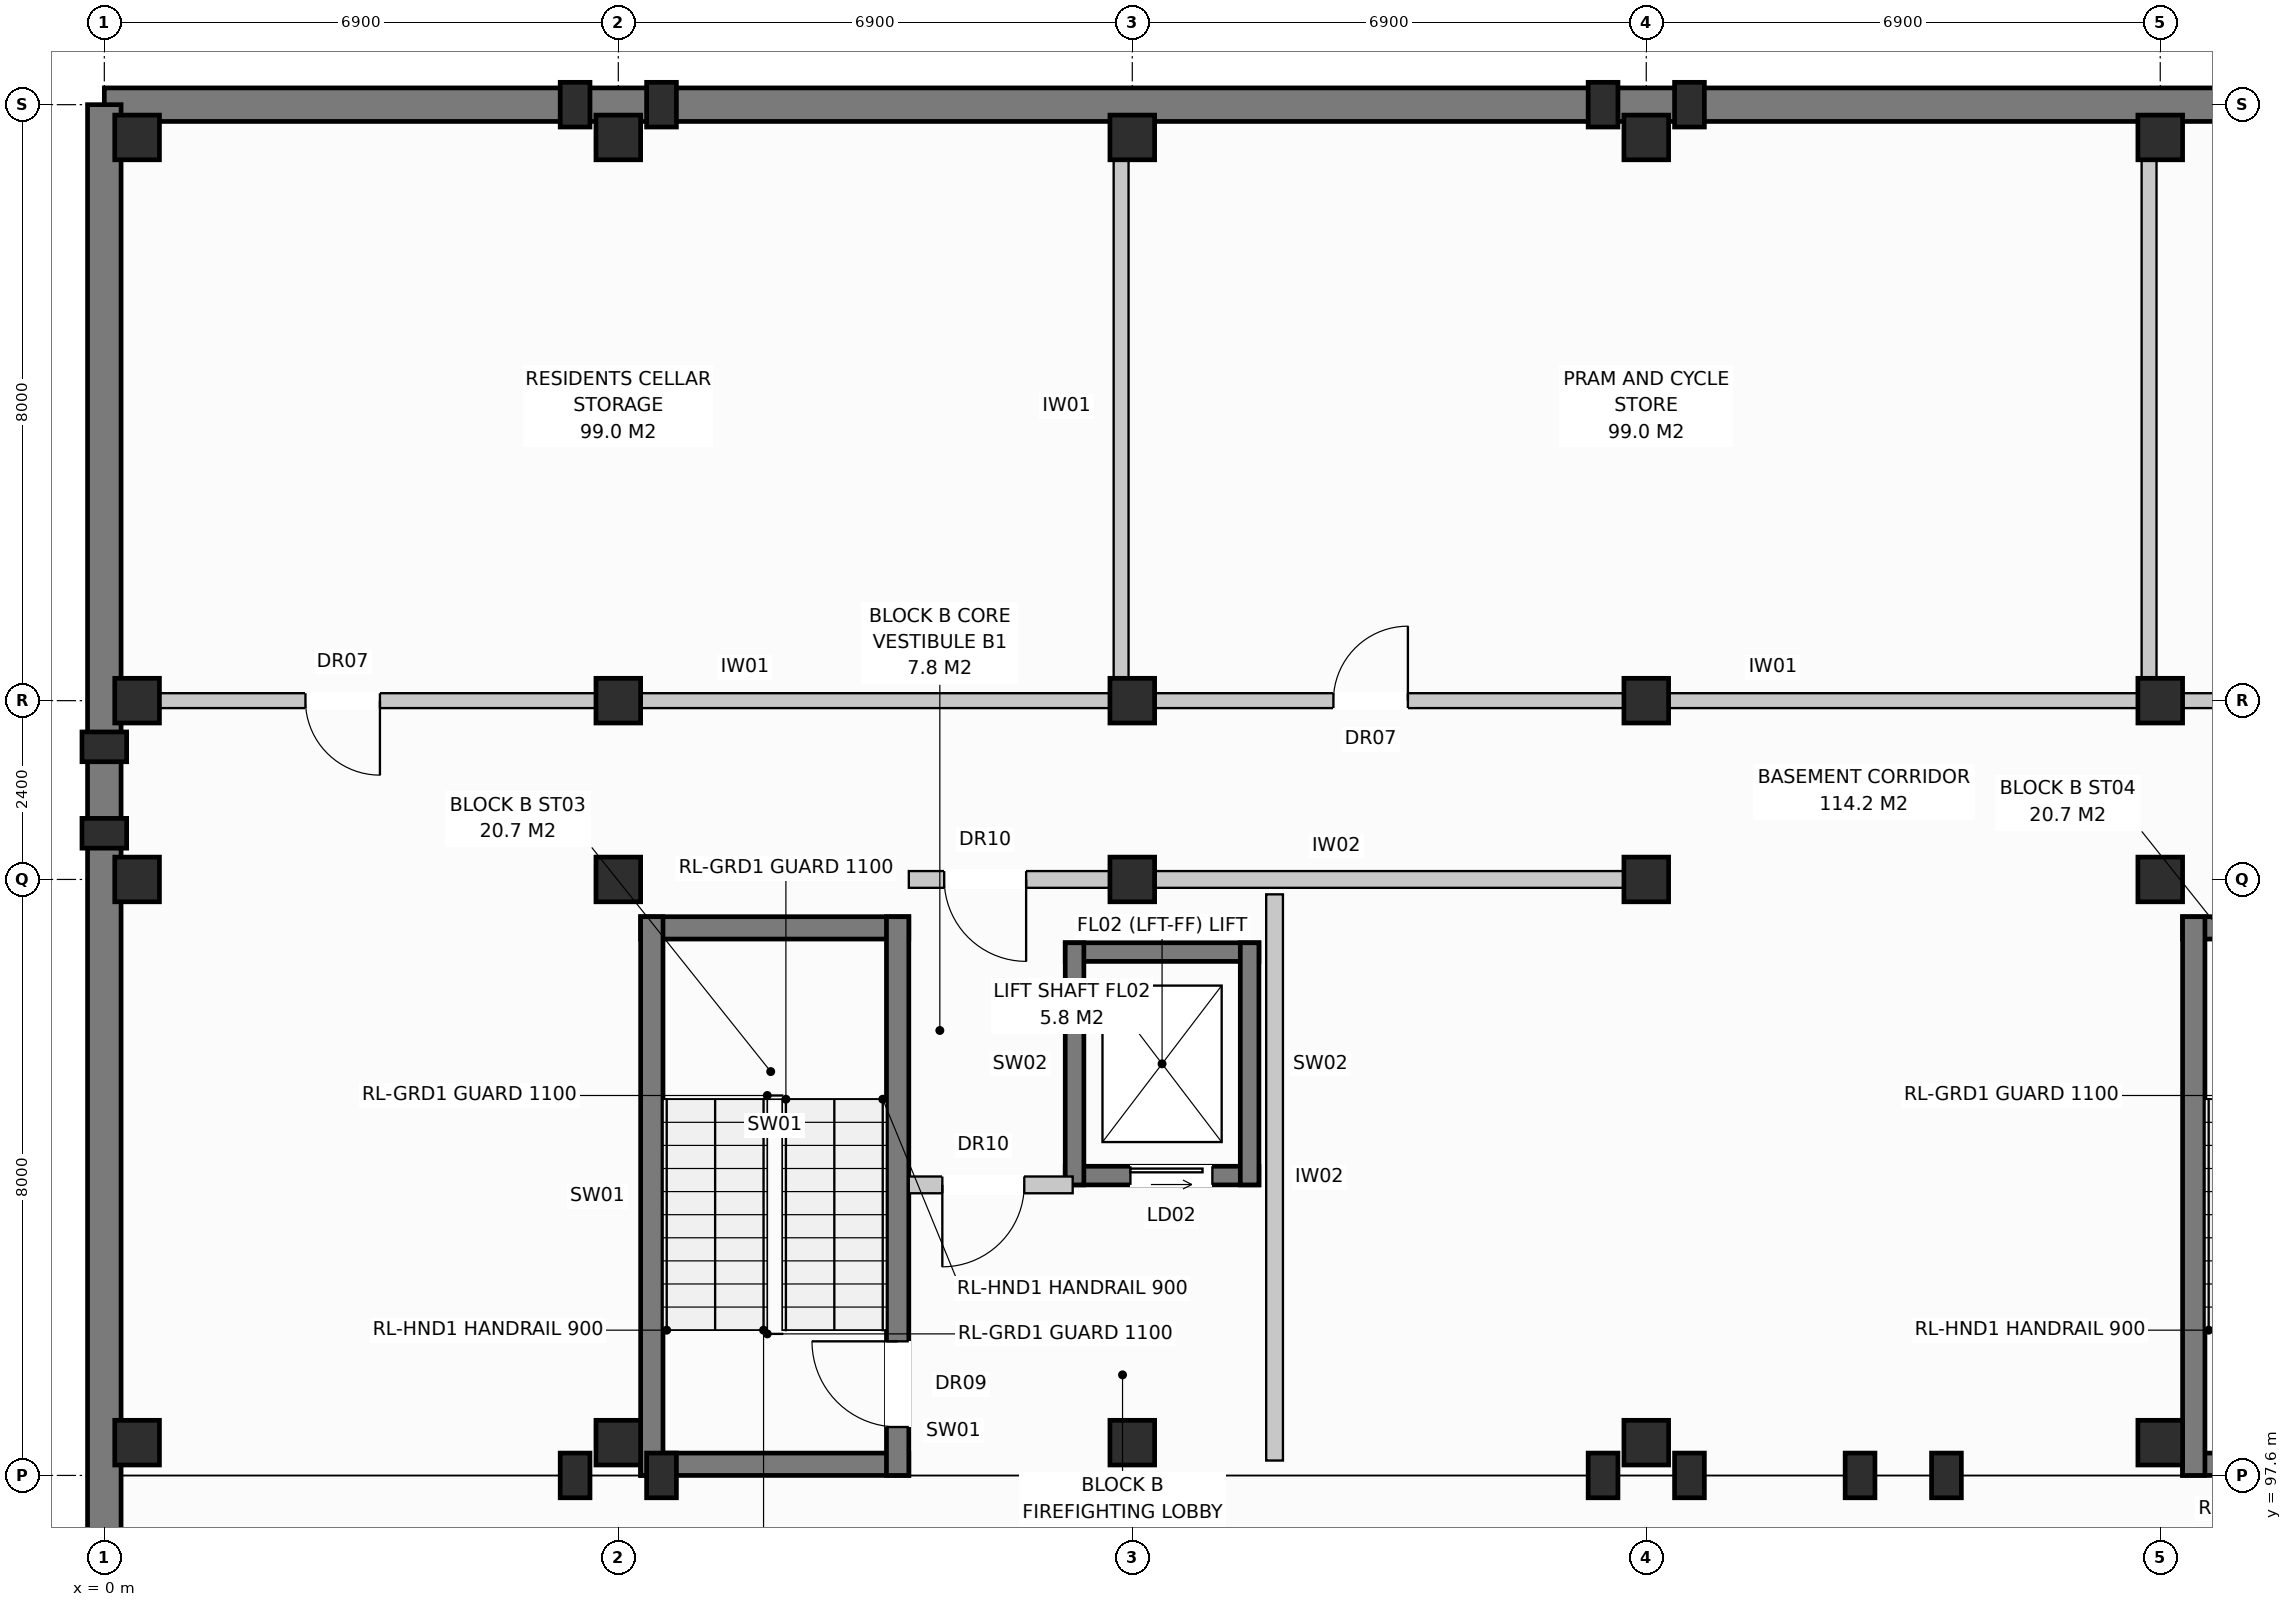
"""IFC4 building model, lengths in metres.
Left out: names, types, materials, properties, quantities, classifications, styles, units other than length and angle.
Written with IfcOpenShell. Run it as: python <this file> out.ifc"""

import sys

from ifc_helpers import new_model, si_unit, direction, frame, frame_2d, origin, origin_with_axes, origin_2d, place, context, subcontext, project, spatial, rectangle, extrude, element, fill, save


model = new_model("IFC4")
c1 = context("Model", 3, precision=1e-05, world=origin(), true_north=direction((0.0, 1.0)))
c2 = subcontext(c1, "Body", "Model", "MODEL_VIEW")
j1 = project(units=[si_unit("LENGTHUNIT", "METRE"), si_unit("PLANEANGLEUNIT", "RADIAN")], contexts=[c1])
p1 = place(None, origin())
s1 = spatial("IfcSite", under=j1, at=p1, CompositionType="ELEMENT")
p2 = place(p1, origin())
s2 = spatial("IfcBuilding", under=s1, at=p2, CompositionType="ELEMENT")
p3 = place(p2, frame((0.0, 0.0, -3.8)))
s3 = spatial("IfcBuildingStorey", under=s2, at=p3, CompositionType="ELEMENT", Elevation=-3.8)
for number, where, z_axis, x_axis in (
    (1, (0.44, 98.04, 0.0), (0.0, 0.0, 1.0), (1.0, 0.0, 0.0)),
    (2, (0.44, 105.6, 0.0), (0.0, 0.0, 1.0), (1.0, 0.0, 0.0)),
    (3, (0.44, 108.0, 0.0), (0.0, 0.0, 1.0), (1.0, 0.0, 0.0)),
    (4, (0.44, 115.56, 0.0), (0.0, 0.0, 1.0), (1.0, 0.0, 0.0)),
    (5, (6.9, 98.04, 0.0), (0.0, 0.0, 1.0), (1.0, 0.0, 0.0)),
    (6, (6.9, 105.6, 0.0), (0.0, 0.0, 1.0), (1.0, 0.0, 0.0)),
    (7, (6.9, 108.0, 0.0), (0.0, 0.0, 1.0), (1.0, 0.0, 0.0)),
    (8, (6.9, 115.56, 0.0), (0.0, 0.0, 1.0), (1.0, 0.0, 0.0)),
    (9, (13.8, 98.04, 0.0), (0.0, 0.0, 1.0), (1.0, 0.0, 0.0)),
    (10, (13.8, 105.6, 0.0), (0.0, 0.0, 1.0), (1.0, 0.0, 0.0)),
    (11, (13.8, 108.0, 0.0), (0.0, 0.0, 1.0), (1.0, 0.0, 0.0)),
    (12, (13.8, 115.56, 0.0), (0.0, 0.0, 1.0), (1.0, 0.0, 0.0)),
    (13, (20.7, 98.04, 0.0), (0.0, 0.0, 1.0), (1.0, 0.0, 0.0)),
    (14, (20.7, 105.6, 0.0), (0.0, 0.0, 1.0), (1.0, 0.0, 0.0)),
    (15, (20.7, 108.0, 0.0), (0.0, 0.0, 1.0), (1.0, 0.0, 0.0)),
    (16, (20.7, 115.56, 0.0), (0.0, 0.0, 1.0), (1.0, 0.0, 0.0)),
    (17, (27.6, 98.04, 0.0), (0.0, 0.0, 1.0), (1.0, 0.0, 0.0)),
    (18, (27.6, 105.6, 0.0), (0.0, 0.0, 1.0), (1.0, 0.0, 0.0)),
    (19, (27.6, 108.0, 0.0), (0.0, 0.0, 1.0), (1.0, 0.0, 0.0)),
    (20, (27.6, 115.56, 0.0), (0.0, 0.0, 1.0), (1.0, 0.0, 0.0)),
):
    element("IfcColumn", number, at=place(p3, frame(where, z_axis=z_axis, x_axis=x_axis)), inside=s3, PredefinedType="COLUMN", context=c2, shape_type="SweptSolid", body=[
        extrude(rectangle(XDim=0.6, YDim=0.6, at=origin_2d()), origin(), (0.0, 0.0, 1.0), 3.8),
    ])
for number, where, z_axis, x_axis in (
    (21, (6.32, 116.0, 0.0), (0.0, 0.0, 1.0), (1.0, 0.0, 0.0)),
    (22, (6.32, 97.6, 0.0), (0.0, 0.0, 1.0), (1.0, 0.0, 0.0)),
    (23, (7.48, 116.0, 0.0), (0.0, 0.0, 1.0), (1.0, 0.0, 0.0)),
    (24, (7.48, 97.6, 0.0), (0.0, 0.0, 1.0), (1.0, 0.0, 0.0)),
    (25, (20.12, 116.0, 0.0), (0.0, 0.0, 1.0), (1.0, 0.0, 0.0)),
    (26, (20.12, 97.6, 0.0), (0.0, 0.0, 1.0), (1.0, 0.0, 0.0)),
    (27, (21.28, 116.0, 0.0), (0.0, 0.0, 1.0), (1.0, 0.0, 0.0)),
    (28, (21.28, 97.6, 0.0), (0.0, 0.0, 1.0), (1.0, 0.0, 0.0)),
    (29, (23.57, 97.6, 0.0), (0.0, 0.0, 1.0), (1.0, 0.0, 0.0)),
    (30, (24.73, 97.6, 0.0), (0.0, 0.0, 1.0), (1.0, 0.0, 0.0)),
    (31, (0.0, 106.22, 0.0), (0.0, 0.0, 1.0), (0.0, 1.0, 0.0)),
    (32, (0.0, 107.38, 0.0), (0.0, 0.0, 1.0), (0.0, 1.0, 0.0)),
):
    element("IfcColumn", number, at=place(p3, frame(where, z_axis=z_axis, x_axis=x_axis)), inside=s3, PredefinedType="PILASTER", context=c2, shape_type="SweptSolid", body=[
        extrude(rectangle(XDim=0.4, YDim=0.6, at=origin_2d()), origin(), (0.0, 0.0, 1.0), 3.8),
    ])
p4 = place(p3, frame((168.0, 116.0, 0.0), z_axis=(0.0, 0.0, 1.0), x_axis=(-1.0, 0.0, 0.0)))
e33 = element("IfcWall", 33, at=p4, inside=s3, PredefinedType="STANDARD", context=c2, shape_type="SweptSolid", body=[
    extrude(rectangle(XDim=168.0, YDim=0.45, at=frame_2d((84.0, 0.0))), origin(), (0.0, 0.0, 1.0), 3.48),
])
p5 = place(p3, frame((0.0, 116.0, 0.0), z_axis=(0.0, 0.0, 1.0), x_axis=(0.0, -1.0, 0.0)))
e34 = element("IfcWall", 34, at=p5, inside=s3, PredefinedType="STANDARD", context=c2, shape_type="SweptSolid", body=[
    extrude(rectangle(XDim=116.0, YDim=0.45, at=frame_2d((58.0, 0.0))), origin(), (0.0, 0.0, 1.0), 3.48),
])
for number, where, z_axis, x_axis in (
    (35, (7.2, 97.75, 0.0), (0.0, 0.0, 1.0), (1.0, 0.0, 0.0)),
    (36, (7.2, 104.95, 0.0), (0.0, 0.0, 1.0), (1.0, 0.0, 0.0)),
):
    element("IfcWall", number, at=place(p3, frame(where, z_axis=z_axis, x_axis=x_axis)), inside=s3, PredefinedType="SHEAR", context=c2, shape_type="SweptSolid", body=[
        extrude(rectangle(XDim=3.6, YDim=0.3, at=frame_2d((1.8, 0.0))), origin(), (0.0, 0.0, 1.0), 3.48),
    ])
p6 = place(p3, frame((7.35, 97.6, 0.0), z_axis=(0.0, 0.0, 1.0), x_axis=(0.0, 1.0, 0.0)))
e37 = element("IfcWall", 37, at=p6, inside=s3, PredefinedType="SHEAR", context=c2, shape_type="SweptSolid", body=[
    extrude(rectangle(XDim=7.5, YDim=0.3, at=frame_2d((3.75, 0.0))), origin(), (0.0, 0.0, 1.0), 3.48),
])
p7 = place(p3, frame((10.65, 97.6, 0.0), z_axis=(0.0, 0.0, 1.0), x_axis=(0.0, 1.0, 0.0)))
e38 = element("IfcWall", 38, at=p7, inside=s3, PredefinedType="SHEAR", context=c2, shape_type="SweptSolid", body=[
    extrude(rectangle(XDim=7.5, YDim=0.3, at=frame_2d((3.75, 0.0))), origin(), (0.0, 0.0, 1.0), 3.48),
])
p8 = place(p7, frame((0.65, 0.0, 0.0)))
e39 = element("IfcOpeningElement", 39, at=p8, cuts=e38, PredefinedType="OPENING", context=c2, shape_type="SweptSolid", body=[
    extrude(rectangle(XDim=1.15, YDim=2.15, at=frame_2d((0.575, 1.075))), frame((0.0, 0.162, 0.0), z_axis=(0.0, -1.0, 0.0), x_axis=(1.0, 0.0, 0.0)), (0.0, 0.0, 1.0), 0.324),
])
p9 = place(p3, frame((12.9, 101.625, 0.0), z_axis=(0.0, 0.0, 1.0), x_axis=(1.0, 0.0, 0.0)))
e40 = element("IfcWall", 40, at=p9, inside=s3, PredefinedType="SHEAR", context=c2, shape_type="SweptSolid", body=[
    extrude(rectangle(XDim=2.6, YDim=0.25, at=frame_2d((1.3, 0.0))), origin(), (0.0, 0.0, 1.0), 3.48),
])
p10 = place(p9, frame((0.875, 0.0, 0.0)))
e41 = element("IfcOpeningElement", 41, at=p10, cuts=e40, PredefinedType="OPENING", context=c2, shape_type="SweptSolid", body=[
    extrude(rectangle(XDim=1.1, YDim=2.1, at=frame_2d((0.55, 1.05))), frame((0.0, 0.137, 0.0), z_axis=(0.0, -1.0, 0.0), x_axis=(1.0, 0.0, 0.0)), (0.0, 0.0, 1.0), 0.274),
])
p11 = place(p3, frame((12.9, 104.625, 0.0), z_axis=(0.0, 0.0, 1.0), x_axis=(1.0, 0.0, 0.0)))
e42 = element("IfcWall", 42, at=p11, inside=s3, PredefinedType="SHEAR", context=c2, shape_type="SweptSolid", body=[
    extrude(rectangle(XDim=2.6, YDim=0.25, at=frame_2d((1.3, 0.0))), origin(), (0.0, 0.0, 1.0), 3.48),
])
for number, where, z_axis, x_axis in (
    (43, (13.025, 101.5, 0.0), (0.0, 0.0, 1.0), (0.0, 1.0, 0.0)),
    (44, (15.375, 101.5, 0.0), (0.0, 0.0, 1.0), (0.0, 1.0, 0.0)),
):
    element("IfcWall", number, at=place(p3, frame(where, z_axis=z_axis, x_axis=x_axis)), inside=s3, PredefinedType="SHEAR", context=c2, shape_type="SweptSolid", body=[
        extrude(rectangle(XDim=3.25, YDim=0.25, at=frame_2d((1.625, 0.0))), origin(), (0.0, 0.0, 1.0), 3.48),
    ])
p12 = place(p3, frame((15.71, 97.8, 0.0), z_axis=(0.0, 0.0, 1.0), x_axis=(0.0, 1.0, 0.0)))
e45 = element("IfcWall", 45, at=p12, inside=s3, PredefinedType="PARTITIONING", context=c2, shape_type="SweptSolid", body=[
    extrude(rectangle(XDim=7.6, YDim=0.225, at=frame_2d((3.8, 0.0))), origin(), (0.0, 0.0, 1.0), 3.19),
])
p13 = place(p3, frame((10.8, 101.5, 0.0), z_axis=(0.0, 0.0, 1.0), x_axis=(1.0, 0.0, 0.0)))
e46 = element("IfcWall", 46, at=p13, inside=s3, PredefinedType="PARTITIONING", context=c2, shape_type="SweptSolid", body=[
    extrude(rectangle(XDim=2.2, YDim=0.225, at=frame_2d((1.1, 0.0))), origin(), (0.0, 0.0, 1.0), 3.48),
])
p14 = place(p13, frame((0.45, 0.0, 0.0)))
e47 = element("IfcOpeningElement", 47, at=p14, cuts=e46, PredefinedType="OPENING", context=c2, shape_type="SweptSolid", body=[
    extrude(rectangle(XDim=1.1, YDim=2.15, at=frame_2d((0.55, 1.075))), frame((0.0, 0.125, 0.0), z_axis=(0.0, -1.0, 0.0), x_axis=(1.0, 0.0, 0.0)), (0.0, 0.0, 1.0), 0.249),
])
p15 = place(p3, frame((6.9, 105.6, 0.0), z_axis=(0.0, 0.0, 1.0), x_axis=(1.0, 0.0, 0.0)))
e48 = element("IfcWall", 48, at=p15, inside=s3, PredefinedType="PARTITIONING", context=c2, shape_type="SweptSolid", body=[
    extrude(rectangle(XDim=0.3, YDim=0.225, at=frame_2d((0.15, 0.0))), origin(), (0.0, 0.0, 1.0), 3.48),
])
p16 = place(p3, frame((10.8, 105.6, 0.0), z_axis=(0.0, 0.0, 1.0), x_axis=(1.0, 0.0, 0.0)))
e49 = element("IfcWall", 49, at=p16, inside=s3, PredefinedType="PARTITIONING", context=c2, shape_type="SweptSolid", body=[
    extrude(rectangle(XDim=9.9, YDim=0.225, at=frame_2d((4.95, 0.0))), origin(), (0.0, 0.0, 1.0), 2.92),
])
p17 = place(p16, frame((0.475, 0.0, 0.0)))
e50 = element("IfcOpeningElement", 50, at=p17, cuts=e49, PredefinedType="OPENING", context=c2, shape_type="SweptSolid", body=[
    extrude(rectangle(XDim=1.1, YDim=2.15, at=frame_2d((0.55, 1.075))), frame((0.0, 0.125, 0.0), z_axis=(0.0, -1.0, 0.0), x_axis=(1.0, 0.0, 0.0)), (0.0, 0.0, 1.0), 0.249),
])
for number, where, z_axis, x_axis in (
    (51, (27.9, 97.75, 0.0), (0.0, 0.0, 1.0), (1.0, 0.0, 0.0)),
    (52, (27.9, 104.95, 0.0), (0.0, 0.0, 1.0), (1.0, 0.0, 0.0)),
):
    element("IfcWall", number, at=place(p3, frame(where, z_axis=z_axis, x_axis=x_axis)), inside=s3, PredefinedType="SHEAR", context=c2, shape_type="SweptSolid", body=[
        extrude(rectangle(XDim=3.6, YDim=0.3, at=frame_2d((1.8, 0.0))), origin(), (0.0, 0.0, 1.0), 3.48),
    ])
p18 = place(p3, frame((28.05, 97.6, 0.0), z_axis=(0.0, 0.0, 1.0), x_axis=(0.0, 1.0, 0.0)))
e53 = element("IfcWall", 53, at=p18, inside=s3, PredefinedType="SHEAR", context=c2, shape_type="SweptSolid", body=[
    extrude(rectangle(XDim=7.5, YDim=0.3, at=frame_2d((3.75, 0.0))), origin(), (0.0, 0.0, 1.0), 3.48),
])
p19 = place(p3, frame((27.6, 105.6, 0.0), z_axis=(0.0, 0.0, 1.0), x_axis=(1.0, 0.0, 0.0)))
e54 = element("IfcWall", 54, at=p19, inside=s3, PredefinedType="PARTITIONING", context=c2, shape_type="SweptSolid", body=[
    extrude(rectangle(XDim=0.3, YDim=0.225, at=frame_2d((0.15, 0.0))), origin(), (0.0, 0.0, 1.0), 3.48),
])
p20 = place(p3, frame((0.3, 108.0, 0.0), z_axis=(0.0, 0.0, 1.0), x_axis=(1.0, 0.0, 0.0)))
e55 = element("IfcWall", 55, at=p20, inside=s3, PredefinedType="PARTITIONING", context=c2, shape_type="SweptSolid", body=[
    extrude(rectangle(XDim=13.2, YDim=0.2, at=frame_2d((6.6, 0.0))), origin(), (0.0, 0.0, 1.0), 2.92),
])
p21 = place(p20, frame((2.4, 0.0, 0.0)))
e56 = element("IfcOpeningElement", 56, at=p21, cuts=e55, PredefinedType="OPENING", context=c2, shape_type="SweptSolid", body=[
    extrude(rectangle(XDim=1.0, YDim=2.15, at=frame_2d((0.5, 1.075))), frame((0.0, 0.112, 0.0), z_axis=(0.0, -1.0, 0.0), x_axis=(1.0, 0.0, 0.0)), (0.0, 0.0, 1.0), 0.224),
])
p22 = place(p3, frame((13.65, 108.2, 0.0), z_axis=(0.0, 0.0, 1.0), x_axis=(0.0, 1.0, 0.0)))
e57 = element("IfcWall", 57, at=p22, inside=s3, PredefinedType="PARTITIONING", context=c2, shape_type="SweptSolid", body=[
    extrude(rectangle(XDim=7.5, YDim=0.2, at=frame_2d((3.75, 0.0))), origin(), (0.0, 0.0, 1.0), 3.48),
])
p23 = place(p3, frame((14.1, 108.0, 0.0), z_axis=(0.0, 0.0, 1.0), x_axis=(1.0, 0.0, 0.0)))
e58 = element("IfcWall", 58, at=p23, inside=s3, PredefinedType="PARTITIONING", context=c2, shape_type="SweptSolid", body=[
    extrude(rectangle(XDim=13.2, YDim=0.2, at=frame_2d((6.6, 0.0))), origin(), (0.0, 0.0, 1.0), 2.92),
])
p24 = place(p23, frame((2.4, 0.0, 0.0)))
e59 = element("IfcOpeningElement", 59, at=p24, cuts=e58, PredefinedType="OPENING", context=c2, shape_type="SweptSolid", body=[
    extrude(rectangle(XDim=1.0, YDim=2.15, at=frame_2d((0.5, 1.075))), frame((0.0, 0.112, 0.0), z_axis=(0.0, -1.0, 0.0), x_axis=(1.0, 0.0, 0.0)), (0.0, 0.0, 1.0), 0.224),
])
p25 = place(p3, frame((27.45, 108.2, 0.0), z_axis=(0.0, 0.0, 1.0), x_axis=(0.0, 1.0, 0.0)))
e60 = element("IfcWall", 60, at=p25, inside=s3, PredefinedType="PARTITIONING", context=c2, shape_type="SweptSolid", body=[
    extrude(rectangle(XDim=7.5, YDim=0.2, at=frame_2d((3.75, 0.0))), origin(), (0.0, 0.0, 1.0), 3.48),
])
p26 = place(p3, frame((27.9, 108.0, 0.0), z_axis=(0.0, 0.0, 1.0), x_axis=(1.0, 0.0, 0.0)))
e61 = element("IfcWall", 61, at=p26, inside=s3, PredefinedType="PARTITIONING", context=c2, shape_type="SweptSolid", body=[
    extrude(rectangle(XDim=13.2, YDim=0.2, at=frame_2d((6.6, 0.0))), origin(), (0.0, 0.0, 1.0), 2.92),
])
p27 = place(p26, frame((2.4, 0.0, 0.0)))
e62 = element("IfcOpeningElement", 62, at=p27, cuts=e61, PredefinedType="OPENING", context=c2, shape_type="SweptSolid", body=[
    extrude(rectangle(XDim=1.0, YDim=2.15, at=frame_2d((0.5, 1.075))), frame((0.0, 0.112, 0.0), z_axis=(0.0, -1.0, 0.0), x_axis=(1.0, 0.0, 0.0)), (0.0, 0.0, 1.0), 0.224),
])
p28 = place(p8, origin_with_axes())
e63 = element("IfcDoor", 63, at=p28, inside=s3, OperationType="SINGLE_SWING_RIGHT", PredefinedType="DOOR", context=c2, shape_type="SweptSolid", body=[
    extrude(rectangle(XDim=1.15, YDim=2.15, at=frame_2d((0.575, 1.075))), frame((0.0, 0.025, 0.0), z_axis=(0.0, -1.0, 0.0), x_axis=(1.0, 0.0, 0.0)), (0.0, 0.0, 1.0), 0.05),
])
fill(e39, e63)
p29 = place(p10, origin_with_axes())
e64 = element("IfcDoor", 64, at=p29, inside=s3, OperationType="SLIDING_TO_LEFT", PredefinedType="DOOR", context=c2, shape_type="SweptSolid", body=[
    extrude(rectangle(XDim=1.1, YDim=2.1, at=frame_2d((0.55, 1.05))), frame((0.0, 0.025, 0.0), z_axis=(0.0, -1.0, 0.0), x_axis=(1.0, 0.0, 0.0)), (0.0, 0.0, 1.0), 0.05),
])
fill(e41, e64)
p30 = place(p14, frame((1.1, 0.0, 0.0), z_axis=(0.0, 0.0, 1.0), x_axis=(-1.0, 0.0, 0.0)))
e65 = element("IfcDoor", 65, at=p30, inside=s3, OperationType="SINGLE_SWING_LEFT", PredefinedType="DOOR", context=c2, shape_type="SweptSolid", body=[
    extrude(rectangle(XDim=1.1, YDim=2.15, at=frame_2d((0.55, 1.075))), frame((0.0, 0.025, 0.0), z_axis=(0.0, -1.0, 0.0), x_axis=(1.0, 0.0, 0.0)), (0.0, 0.0, 1.0), 0.05),
])
fill(e47, e65)
p31 = place(p17, frame((1.1, 0.0, 0.0), z_axis=(0.0, 0.0, 1.0), x_axis=(-1.0, 0.0, 0.0)))
e66 = element("IfcDoor", 66, at=p31, inside=s3, OperationType="SINGLE_SWING_RIGHT", PredefinedType="DOOR", context=c2, shape_type="SweptSolid", body=[
    extrude(rectangle(XDim=1.1, YDim=2.15, at=frame_2d((0.55, 1.075))), frame((0.0, 0.025, 0.0), z_axis=(0.0, -1.0, 0.0), x_axis=(1.0, 0.0, 0.0)), (0.0, 0.0, 1.0), 0.05),
])
fill(e50, e66)
p32 = place(p21, frame((1.0, 0.0, 0.0), z_axis=(0.0, 0.0, 1.0), x_axis=(-1.0, 0.0, 0.0)))
e67 = element("IfcDoor", 67, at=p32, inside=s3, OperationType="SINGLE_SWING_RIGHT", PredefinedType="DOOR", context=c2, shape_type="SweptSolid", body=[
    extrude(rectangle(XDim=1.0, YDim=2.15, at=frame_2d((0.5, 1.075))), frame((0.0, 0.025, 0.0), z_axis=(0.0, -1.0, 0.0), x_axis=(1.0, 0.0, 0.0)), (0.0, 0.0, 1.0), 0.05),
])
fill(e56, e67)
p33 = place(p24, origin_with_axes())
e68 = element("IfcDoor", 68, at=p33, inside=s3, OperationType="SINGLE_SWING_RIGHT", PredefinedType="DOOR", context=c2, shape_type="SweptSolid", body=[
    extrude(rectangle(XDim=1.0, YDim=2.15, at=frame_2d((0.5, 1.075))), frame((0.0, 0.025, 0.0), z_axis=(0.0, -1.0, 0.0), x_axis=(1.0, 0.0, 0.0)), (0.0, 0.0, 1.0), 0.05),
])
fill(e59, e68)
save(model, sys.argv[1])
